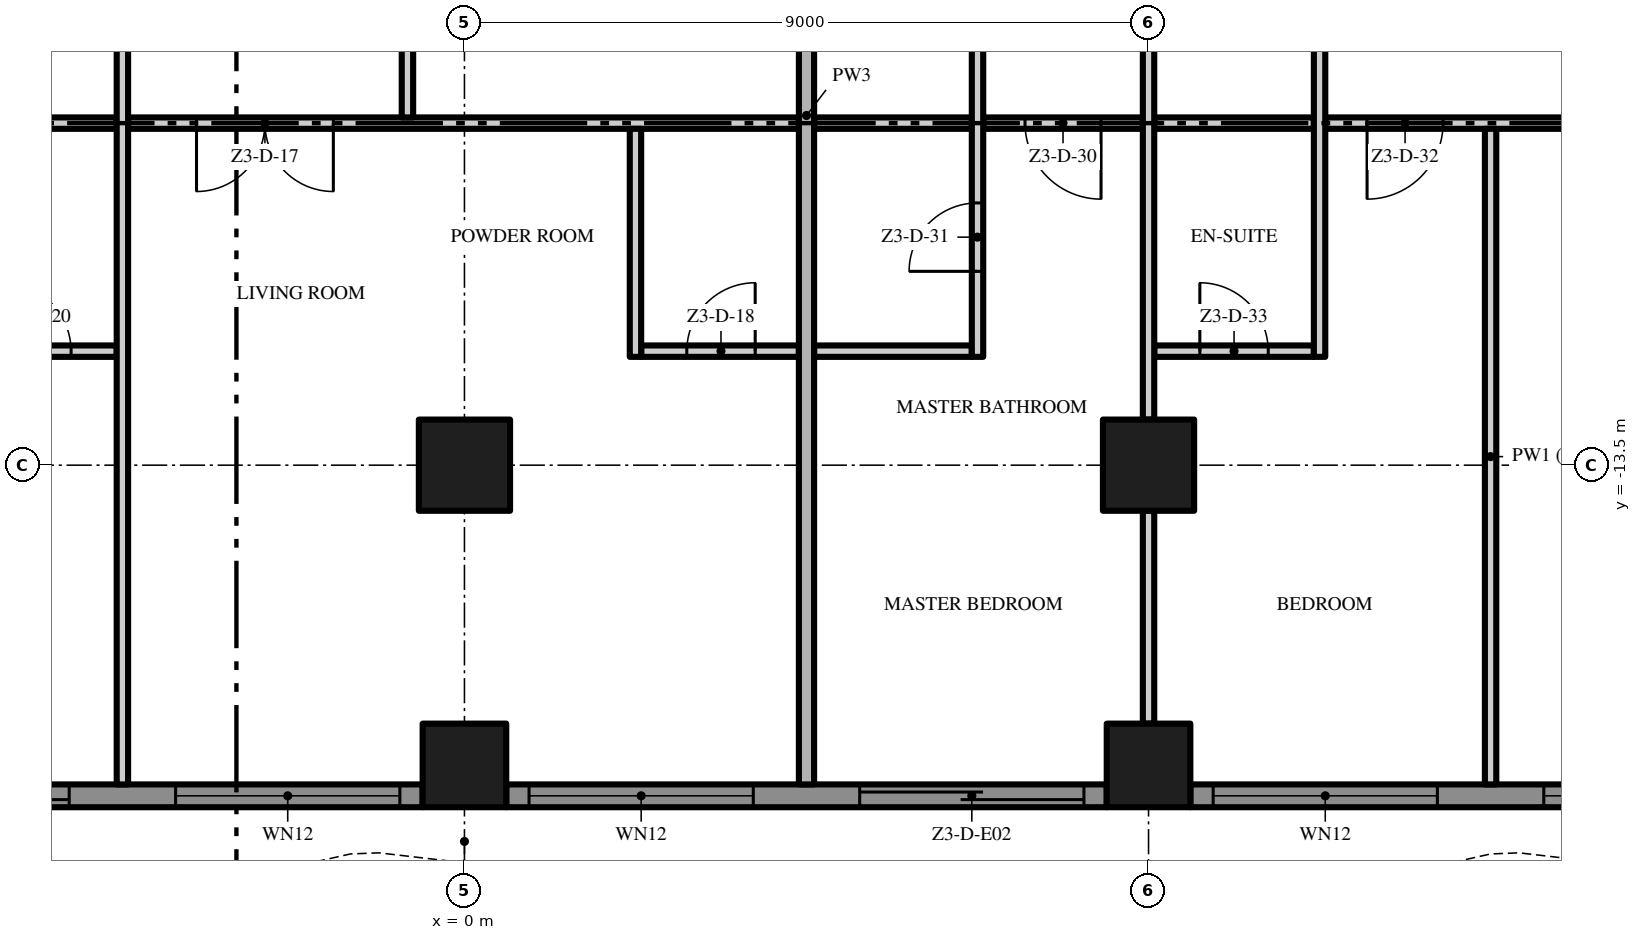
"""IFC4 building model, lengths in metres.
Left out: names, types, materials, properties, quantities, classifications, styles, units other than length and angle.
Written with IfcOpenShell. Run it as: python <this file> out.ifc"""

import sys

from ifc_helpers import new_model, si_unit, direction, frame, frame_2d, origin, origin_2d, place, context, subcontext, project, spatial, polyline, rectangle, outline, extrude, element, fill, save


model = new_model("IFC4")
c1 = context("Model", 3, precision=1e-05, world=origin(), true_north=direction((0.0, 1.0)))
c2 = subcontext(c1, "Body", "Model", "MODEL_VIEW")
j1 = project(units=[si_unit("LENGTHUNIT", "METRE"), si_unit("PLANEANGLEUNIT", "RADIAN")], contexts=[c1])
p1 = place(None, origin())
s1 = spatial("IfcSite", under=j1, at=p1, CompositionType="ELEMENT")
p2 = place(p1, origin())
s2 = spatial("IfcBuilding", under=s1, at=p2, CompositionType="ELEMENT")
p3 = place(p2, frame((0.0, 0.0, 163.0)))
s3 = spatial("IfcBuildingStorey", under=s2, at=p3, CompositionType="ELEMENT", Elevation=163.0)
p4 = place(p3, frame((0.0, -13.5, 0.0), z_axis=(0.0, 0.0, 1.0), x_axis=(1.0, 0.0, 0.0)))
e1 = element("IfcColumn", 1, at=p4, inside=s3, PredefinedType="COLUMN", context=c2, shape_type="SweptSolid", body=[
    extrude(rectangle(XDim=1.2, YDim=1.2, at=origin_2d()), origin(), (0.0, 0.0, 1.0), 3.5),
])
p5 = place(p3, frame((0.0, -17.45, 0.0), z_axis=(0.0, 0.0, 1.0), x_axis=(1.0, 0.0, 0.0)))
e2 = element("IfcColumn", 2, at=p5, inside=s3, PredefinedType="COLUMN", context=c2, shape_type="SweptSolid", body=[
    extrude(rectangle(XDim=1.1, YDim=1.1, at=origin_2d()), origin(), (0.0, 0.0, 1.0), 3.5),
])
p6 = place(p3, frame((9.0, -13.5, 0.0), z_axis=(0.0, 0.0, 1.0), x_axis=(1.0, 0.0, 0.0)))
e3 = element("IfcColumn", 3, at=p6, inside=s3, PredefinedType="COLUMN", context=c2, shape_type="SweptSolid", body=[
    extrude(rectangle(XDim=1.2, YDim=1.2, at=origin_2d()), origin(), (0.0, 0.0, 1.0), 3.5),
])
p7 = place(p3, frame((9.0, -17.45, 0.0), z_axis=(0.0, 0.0, 1.0), x_axis=(1.0, 0.0, 0.0)))
e4 = element("IfcColumn", 4, at=p7, inside=s3, PredefinedType="COLUMN", context=c2, shape_type="SweptSolid", body=[
    extrude(rectangle(XDim=1.1, YDim=1.1, at=origin_2d()), origin(), (0.0, 0.0, 1.0), 3.5),
])
p8 = place(p3, frame((-0.55, -17.85, 0.0), z_axis=(0.0, 0.0, 1.0), x_axis=(-1.0, 0.0, 0.0)))
e5 = element("IfcWall", 5, at=p8, inside=s3, PredefinedType="SOLIDWALL", context=c2, shape_type="SweptSolid", body=[
    extrude(rectangle(XDim=7.9, YDim=0.3, at=frame_2d((3.95, 0.0))), origin(), (0.0, 0.0, 1.0), 3.5),
])
p9 = place(p8, frame((4.65, 0.0, 0.0)))
e6 = element("IfcOpeningElement", 6, at=p9, cuts=e5, PredefinedType="OPENING", context=c2, shape_type="SweptSolid", body=[
    extrude(rectangle(XDim=2.95, YDim=2.4, at=frame_2d((1.475, 1.2))), frame((0.0, 0.16, 0.0), z_axis=(0.0, -1.0, 0.0), x_axis=(1.0, 0.0, 0.0)), (0.0, 0.0, 1.0), 0.32),
])
p10 = place(p8, frame((0.3, 0.0, 0.45)))
e7 = element("IfcOpeningElement", 7, at=p10, cuts=e5, PredefinedType="OPENING", context=c2, shape_type="SweptSolid", body=[
    extrude(rectangle(XDim=2.95, YDim=2.65, at=frame_2d((1.475, 1.325))), frame((0.0, 0.16, 0.0), z_axis=(0.0, -1.0, 0.0), x_axis=(1.0, 0.0, 0.0)), (0.0, 0.0, 1.0), 0.32),
])
p11 = place(p3, frame((8.45, -17.85, 0.0), z_axis=(0.0, 0.0, 1.0), x_axis=(-1.0, 0.0, 0.0)))
e8 = element("IfcWall", 8, at=p11, inside=s3, PredefinedType="SOLIDWALL", context=c2, shape_type="SweptSolid", body=[
    extrude(rectangle(XDim=7.9, YDim=0.3, at=frame_2d((3.95, 0.0))), origin(), (0.0, 0.0, 1.0), 3.5),
])
p12 = place(p11, frame((4.65, 0.0, 0.45)))
e9 = element("IfcOpeningElement", 9, at=p12, cuts=e8, PredefinedType="OPENING", context=c2, shape_type="SweptSolid", body=[
    extrude(rectangle(XDim=2.95, YDim=2.65, at=frame_2d((1.475, 1.325))), frame((0.0, 0.16, 0.0), z_axis=(0.0, -1.0, 0.0), x_axis=(1.0, 0.0, 0.0)), (0.0, 0.0, 1.0), 0.32),
])
p13 = place(p11, frame((0.3, 0.0, 0.0)))
e10 = element("IfcOpeningElement", 10, at=p13, cuts=e8, PredefinedType="OPENING", context=c2, shape_type="SweptSolid", body=[
    extrude(rectangle(XDim=2.95, YDim=2.4, at=frame_2d((1.475, 1.2))), frame((0.0, 0.16, 0.0), z_axis=(0.0, -1.0, 0.0), x_axis=(1.0, 0.0, 0.0)), (0.0, 0.0, 1.0), 0.32),
])
p14 = place(p3, frame((16.9, -17.85, 0.0), z_axis=(0.0, 0.0, 1.0), x_axis=(-1.0, 0.0, 0.0)))
e11 = element("IfcWall", 11, at=p14, inside=s3, PredefinedType="SOLIDWALL", context=c2, shape_type="SweptSolid", body=[
    extrude(rectangle(XDim=7.35, YDim=0.3, at=frame_2d((3.675, 0.0))), origin(), (0.0, 0.0, 1.0), 3.5),
])
p15 = place(p14, frame((4.1, 0.0, 0.45)))
e12 = element("IfcOpeningElement", 12, at=p15, cuts=e11, PredefinedType="OPENING", context=c2, shape_type="SweptSolid", body=[
    extrude(rectangle(XDim=2.95, YDim=2.65, at=frame_2d((1.475, 1.325))), frame((0.0, 0.16, 0.0), z_axis=(0.0, -1.0, 0.0), x_axis=(1.0, 0.0, 0.0)), (0.0, 0.0, 1.0), 0.32),
])
p16 = place(p14, frame((0.3, 0.0, 0.45)))
e13 = element("IfcOpeningElement", 13, at=p16, cuts=e11, PredefinedType="OPENING", context=c2, shape_type="SweptSolid", body=[
    extrude(rectangle(XDim=2.4, YDim=2.65, at=frame_2d((1.2, 1.325))), frame((0.0, 0.16, 0.0), z_axis=(0.0, -1.0, 0.0), x_axis=(1.0, 0.0, 0.0)), (0.0, 0.0, 1.0), 0.32),
])
p17 = place(p3, origin())
e14 = element("IfcWall", 14, at=p17, inside=s3, PredefinedType="USERDEFINED", context=c2, shape_type="SweptSolid", body=[
    extrude(outline(polyline([(-18.0, -18.951), (-16.5, -18.615), (-16.125, -18.6), (-15.0, -18.731), (-13.5, -19.255), (-12.0, -19.988), (-10.5, -20.649), (-9.0, -20.985), (-8.625, -21.0), (-7.5, -20.869), (-6.0, -20.345), (-4.5, -19.612), (-3.0, -18.951), (-1.5, -18.615), (-1.125, -18.6), (0.0, -18.731), (1.5, -19.255), (3.0, -19.988), (4.5, -20.649), (6.0, -20.985), (6.375, -21.0), (7.5, -20.869), (9.0, -20.345), (10.5, -19.612), (12.0, -18.951), (13.5, -18.615), (13.875, -18.6), (15.0, -18.731), (16.5, -19.255), (18.0, -19.988), (18.11, -19.763), (16.596, -19.024), (15.056, -18.486), (13.885, -18.349), (13.467, -18.366), (11.921, -18.713), (10.395, -19.385), (8.904, -20.114), (7.444, -20.624), (6.365, -20.749), (6.033, -20.736), (4.579, -20.41), (3.105, -19.761), (1.596, -19.024), (0.056, -18.486), (-1.115, -18.349), (-1.533, -18.366), (-3.079, -18.713), (-4.605, -19.385), (-6.096, -20.114), (-7.556, -20.624), (-8.635, -20.749), (-8.967, -20.736), (-10.421, -20.41), (-11.895, -19.761), (-13.404, -19.024), (-14.944, -18.486), (-16.115, -18.349), (-16.533, -18.366), (-18.055, -18.708), (-18.0, -18.951)])), origin(), (0.0, 0.0, 1.0), 0.9),
])
p18 = place(p3, frame((-6.675, -12.0, 0.0), z_axis=(0.0, 0.0, 1.0), x_axis=(1.0, 0.0, 0.0)))
e15 = element("IfcWall", 15, at=p18, inside=s3, PredefinedType="PARTITIONING", context=c2, shape_type="SweptSolid", body=[
    extrude(rectangle(XDim=2.1, YDim=0.15, at=frame_2d((1.05, 0.0))), origin(), (0.0, 0.0, 1.0), 3.5),
])
p19 = place(p18, frame((0.6, 0.0, 0.0)))
e16 = element("IfcOpeningElement", 16, at=p19, cuts=e15, PredefinedType="OPENING", context=c2, shape_type="SweptSolid", body=[
    extrude(rectangle(XDim=0.9, YDim=2.1, at=frame_2d((0.45, 1.05))), frame((0.0, 0.085, 0.0), z_axis=(0.0, -1.0, 0.0), x_axis=(1.0, 0.0, 0.0)), (0.0, 0.0, 1.0), 0.17),
])
p20 = place(p3, frame((2.325, -12.0, 0.0), z_axis=(0.0, 0.0, 1.0), x_axis=(1.0, 0.0, 0.0)))
e17 = element("IfcWall", 17, at=p20, inside=s3, PredefinedType="PARTITIONING", context=c2, shape_type="SweptSolid", body=[
    extrude(rectangle(XDim=2.075, YDim=0.15, at=frame_2d((1.038, 0.0))), origin(), (0.0, 0.0, 1.0), 3.5),
])
p21 = place(p20, frame((0.6, 0.0, 0.0)))
e18 = element("IfcOpeningElement", 18, at=p21, cuts=e17, PredefinedType="OPENING", context=c2, shape_type="SweptSolid", body=[
    extrude(rectangle(XDim=0.9, YDim=2.1, at=frame_2d((0.45, 1.05))), frame((0.0, 0.085, 0.0), z_axis=(0.0, -1.0, 0.0), x_axis=(1.0, 0.0, 0.0)), (0.0, 0.0, 1.0), 0.17),
])
p22 = place(p3, frame((4.6, -12.0, 0.0), z_axis=(0.0, 0.0, 1.0), x_axis=(1.0, 0.0, 0.0)))
e19 = element("IfcWall", 19, at=p22, inside=s3, PredefinedType="PARTITIONING", context=c2, shape_type="SweptSolid", body=[
    extrude(rectangle(XDim=2.075, YDim=0.15, at=frame_2d((1.038, 0.0))), origin(), (0.0, 0.0, 1.0), 3.5),
])
p23 = place(p3, frame((9.075, -12.0, 0.0), z_axis=(0.0, 0.0, 1.0), x_axis=(1.0, 0.0, 0.0)))
e20 = element("IfcWall", 20, at=p23, inside=s3, PredefinedType="PARTITIONING", context=c2, shape_type="SweptSolid", body=[
    extrude(rectangle(XDim=2.1, YDim=0.15, at=frame_2d((1.05, 0.0))), origin(), (0.0, 0.0, 1.0), 3.5),
])
p24 = place(p23, frame((0.6, 0.0, 0.0)))
e21 = element("IfcOpeningElement", 21, at=p24, cuts=e20, PredefinedType="OPENING", context=c2, shape_type="SweptSolid", body=[
    extrude(rectangle(XDim=0.9, YDim=2.1, at=frame_2d((0.45, 1.05))), frame((0.0, 0.085, 0.0), z_axis=(0.0, -1.0, 0.0), x_axis=(1.0, 0.0, 0.0)), (0.0, 0.0, 1.0), 0.17),
])
p25 = place(p3, frame((-6.675, -9.0, 0.0), z_axis=(0.0, 0.0, 1.0), x_axis=(1.0, 0.0, 0.0)))
e22 = element("IfcWall", 22, at=p25, inside=s3, PredefinedType="PARTITIONING", context=c2, shape_type="SweptSolid", body=[
    extrude(rectangle(XDim=2.1, YDim=0.15, at=frame_2d((1.05, 0.0))), origin(), (0.0, 0.0, 1.0), 3.5),
])
p26 = place(p3, frame((4.4, -9.0, 0.0), z_axis=(0.0, 0.0, 1.0), x_axis=(-1.0, 0.0, 0.0)))
e23 = element("IfcWall", 23, at=p26, inside=s3, PredefinedType="PARTITIONING", context=c2, shape_type="SweptSolid", body=[
    extrude(rectangle(XDim=8.825, YDim=0.15, at=frame_2d((4.412, 0.0))), origin(), (0.0, 0.0, 1.0), 3.5),
])
p27 = place(p26, frame((6.125, 0.0, 0.0)))
e24 = element("IfcOpeningElement", 24, at=p27, cuts=e23, PredefinedType="OPENING", context=c2, shape_type="SweptSolid", body=[
    extrude(rectangle(XDim=1.8, YDim=2.4, at=frame_2d((0.9, 1.2))), frame((0.0, 0.085, 0.0), z_axis=(0.0, -1.0, 0.0), x_axis=(1.0, 0.0, 0.0)), (0.0, 0.0, 1.0), 0.17),
])
p28 = place(p3, frame((4.6, -9.0, 0.0), z_axis=(0.0, 0.0, 1.0), x_axis=(1.0, 0.0, 0.0)))
e25 = element("IfcWall", 25, at=p28, inside=s3, PredefinedType="PARTITIONING", context=c2, shape_type="SweptSolid", body=[
    extrude(rectangle(XDim=2.075, YDim=0.15, at=frame_2d((1.038, 0.0))), origin(), (0.0, 0.0, 1.0), 3.5),
])
p29 = place(p3, frame((8.925, -9.0, 0.0), z_axis=(0.0, 0.0, 1.0), x_axis=(-1.0, 0.0, 0.0)))
e26 = element("IfcWall", 26, at=p29, inside=s3, PredefinedType="PARTITIONING", context=c2, shape_type="SweptSolid", body=[
    extrude(rectangle(XDim=2.1, YDim=0.15, at=frame_2d((1.05, 0.0))), origin(), (0.0, 0.0, 1.0), 3.5),
])
p30 = place(p29, frame((0.55, 0.0, 0.0)))
e27 = element("IfcOpeningElement", 27, at=p30, cuts=e26, PredefinedType="OPENING", context=c2, shape_type="SweptSolid", body=[
    extrude(rectangle(XDim=1.0, YDim=2.4, at=frame_2d((0.5, 1.2))), frame((0.0, 0.085, 0.0), z_axis=(0.0, -1.0, 0.0), x_axis=(1.0, 0.0, 0.0)), (0.0, 0.0, 1.0), 0.17),
])
p31 = place(p3, frame((9.075, -9.0, 0.0), z_axis=(0.0, 0.0, 1.0), x_axis=(1.0, 0.0, 0.0)))
e28 = element("IfcWall", 28, at=p31, inside=s3, PredefinedType="PARTITIONING", context=c2, shape_type="SweptSolid", body=[
    extrude(rectangle(XDim=2.1, YDim=0.15, at=frame_2d((1.05, 0.0))), origin(), (0.0, 0.0, 1.0), 3.5),
])
p32 = place(p3, frame((22.2, -9.0, 0.0), z_axis=(0.0, 0.0, 1.0), x_axis=(-1.0, 0.0, 0.0)))
e29 = element("IfcWall", 29, at=p32, inside=s3, PredefinedType="PARTITIONING", context=c2, shape_type="SweptSolid", body=[
    extrude(rectangle(XDim=10.875, YDim=0.15, at=frame_2d((5.438, 0.0))), origin(), (0.0, 0.0, 1.0), 3.5),
])
p33 = place(p32, frame((9.325, 0.0, 0.0)))
e30 = element("IfcOpeningElement", 30, at=p33, cuts=e29, PredefinedType="OPENING", context=c2, shape_type="SweptSolid", body=[
    extrude(rectangle(XDim=1.0, YDim=2.4, at=frame_2d((0.5, 1.2))), frame((0.0, 0.085, 0.0), z_axis=(0.0, -1.0, 0.0), x_axis=(1.0, 0.0, 0.0)), (0.0, 0.0, 1.0), 0.17),
])
p34 = place(p32, frame((5.95, 0.0, 0.0)))
e31 = element("IfcOpeningElement", 31, at=p34, cuts=e29, PredefinedType="OPENING", context=c2, shape_type="SweptSolid", body=[
    extrude(rectangle(XDim=1.8, YDim=2.4, at=frame_2d((0.9, 1.2))), frame((0.0, 0.085, 0.0), z_axis=(0.0, -1.0, 0.0), x_axis=(1.0, 0.0, 0.0)), (0.0, 0.0, 1.0), 0.17),
])
p35 = place(p3, frame((-4.5, -17.7, 0.0), z_axis=(0.0, 0.0, 1.0), x_axis=(0.0, 1.0, 0.0)))
e32 = element("IfcWall", 32, at=p35, inside=s3, PredefinedType="PARTITIONING", context=c2, shape_type="SweptSolid", body=[
    extrude(rectangle(XDim=13.275, YDim=0.15, at=frame_2d((6.638, 0.0))), origin(), (0.0, 0.0, 1.0), 3.5),
])
p36 = place(p35, frame((10.5, 0.0, 0.0)))
e33 = element("IfcOpeningElement", 33, at=p36, cuts=e32, PredefinedType="OPENING", context=c2, shape_type="SweptSolid", body=[
    extrude(rectangle(XDim=0.9, YDim=2.1, at=frame_2d((0.45, 1.05))), frame((0.0, 0.085, 0.0), z_axis=(0.0, -1.0, 0.0), x_axis=(1.0, 0.0, 0.0)), (0.0, 0.0, 1.0), 0.17),
])
p37 = place(p3, frame((-0.75, -8.925, 0.0), z_axis=(0.0, 0.0, 1.0), x_axis=(0.0, 1.0, 0.0)))
e34 = element("IfcWall", 34, at=p37, inside=s3, PredefinedType="PARTITIONING", context=c2, shape_type="SweptSolid", body=[
    extrude(rectangle(XDim=4.5, YDim=0.15, at=frame_2d((2.25, 0.0))), origin(), (0.0, 0.0, 1.0), 3.5),
])
p38 = place(p3, frame((2.25, -12.075, 0.0), z_axis=(0.0, 0.0, 1.0), x_axis=(0.0, 1.0, 0.0)))
e35 = element("IfcWall", 35, at=p38, inside=s3, PredefinedType="PARTITIONING", context=c2, shape_type="SweptSolid", body=[
    extrude(rectangle(XDim=3.0, YDim=0.15, at=frame_2d((1.5, 0.0))), origin(), (0.0, 0.0, 1.0), 3.5),
])
p39 = place(p3, frame((4.5, -17.7, 0.0), z_axis=(0.0, 0.0, 1.0), x_axis=(0.0, 1.0, 0.0)))
e36 = element("IfcWall", 36, at=p39, inside=s3, PredefinedType="PARTITIONING", context=c2, shape_type="SweptSolid", body=[
    extrude(rectangle(XDim=17.6, YDim=0.2, at=frame_2d((8.8, 0.0))), origin(), (0.0, 0.0, 1.0), 3.5),
])
p40 = place(p3, frame((6.75, -12.075, 0.0), z_axis=(0.0, 0.0, 1.0), x_axis=(0.0, 1.0, 0.0)))
e37 = element("IfcWall", 37, at=p40, inside=s3, PredefinedType="PARTITIONING", context=c2, shape_type="SweptSolid", body=[
    extrude(rectangle(XDim=7.65, YDim=0.15, at=frame_2d((3.825, 0.0))), origin(), (0.0, 0.0, 1.0), 3.5),
])
p41 = place(p40, frame((4.875, 0.0, 0.0)))
e38 = element("IfcOpeningElement", 38, at=p41, cuts=e37, PredefinedType="OPENING", context=c2, shape_type="SweptSolid", body=[
    extrude(rectangle(XDim=0.9, YDim=2.1, at=frame_2d((0.45, 1.05))), frame((0.0, 0.085, 0.0), z_axis=(0.0, -1.0, 0.0), x_axis=(1.0, 0.0, 0.0)), (0.0, 0.0, 1.0), 0.17),
])
p42 = place(p40, frame((1.125, 0.0, 0.0)))
e39 = element("IfcOpeningElement", 39, at=p42, cuts=e37, PredefinedType="OPENING", context=c2, shape_type="SweptSolid", body=[
    extrude(rectangle(XDim=0.9, YDim=2.1, at=frame_2d((0.45, 1.05))), frame((0.0, 0.085, 0.0), z_axis=(0.0, -1.0, 0.0), x_axis=(1.0, 0.0, 0.0)), (0.0, 0.0, 1.0), 0.17),
])
p43 = place(p3, frame((9.0, -16.9, 0.0), z_axis=(0.0, 0.0, 1.0), x_axis=(0.0, 1.0, 0.0)))
e40 = element("IfcWall", 40, at=p43, inside=s3, PredefinedType="PARTITIONING", context=c2, shape_type="SweptSolid", body=[
    extrude(rectangle(XDim=2.8, YDim=0.15, at=frame_2d((1.4, 0.0))), origin(), (0.0, 0.0, 1.0), 3.5),
])
p44 = place(p3, frame((9.0, -12.9, 0.0), z_axis=(0.0, 0.0, 1.0), x_axis=(0.0, 1.0, 0.0)))
e41 = element("IfcWall", 41, at=p44, inside=s3, PredefinedType="PARTITIONING", context=c2, shape_type="SweptSolid", body=[
    extrude(rectangle(XDim=7.8, YDim=0.15, at=frame_2d((3.9, 0.0))), origin(), (0.0, 0.0, 1.0), 3.5),
])
p45 = place(p3, frame((11.25, -12.075, 0.0), z_axis=(0.0, 0.0, 1.0), x_axis=(0.0, 1.0, 0.0)))
e42 = element("IfcWall", 42, at=p45, inside=s3, PredefinedType="PARTITIONING", context=c2, shape_type="SweptSolid", body=[
    extrude(rectangle(XDim=7.65, YDim=0.15, at=frame_2d((3.825, 0.0))), origin(), (0.0, 0.0, 1.0), 3.5),
])
p46 = place(p3, frame((13.5, -17.7, 0.0), z_axis=(0.0, 0.0, 1.0), x_axis=(0.0, 1.0, 0.0)))
e43 = element("IfcWall", 43, at=p46, inside=s3, PredefinedType="PARTITIONING", context=c2, shape_type="SweptSolid", body=[
    extrude(rectangle(XDim=8.625, YDim=0.15, at=frame_2d((4.312, 0.0))), origin(), (0.0, 0.0, 1.0), 3.5),
])
p47 = place(p9, origin())
e44 = element("IfcDoor", 44, at=p47, inside=s3, OperationType="SINGLE_SWING_LEFT", PredefinedType="DOOR", context=c2, shape_type="SweptSolid", body=[
    extrude(rectangle(XDim=2.95, YDim=2.4, at=frame_2d((1.475, 1.2))), frame((0.0, 0.025, 0.0), z_axis=(0.0, -1.0, 0.0), x_axis=(1.0, 0.0, 0.0)), (0.0, 0.0, 1.0), 0.05),
])
fill(e6, e44)
p48 = place(p10, origin())
e45 = element("IfcWindow", 45, at=p48, inside=s3, PartitioningType="SINGLE_PANEL", PredefinedType="WINDOW", context=c2, shape_type="SweptSolid", body=[
    extrude(rectangle(XDim=2.95, YDim=2.65, at=frame_2d((1.475, 1.325))), frame((0.0, 0.03, 0.0), z_axis=(0.0, -1.0, 0.0), x_axis=(1.0, 0.0, 0.0)), (0.0, 0.0, 1.0), 0.06),
])
fill(e7, e45)
p49 = place(p12, origin())
e46 = element("IfcWindow", 46, at=p49, inside=s3, PartitioningType="SINGLE_PANEL", PredefinedType="WINDOW", context=c2, shape_type="SweptSolid", body=[
    extrude(rectangle(XDim=2.95, YDim=2.65, at=frame_2d((1.475, 1.325))), frame((0.0, 0.03, 0.0), z_axis=(0.0, -1.0, 0.0), x_axis=(1.0, 0.0, 0.0)), (0.0, 0.0, 1.0), 0.06),
])
fill(e9, e46)
p50 = place(p13, origin())
e47 = element("IfcDoor", 47, at=p50, inside=s3, OperationType="SINGLE_SWING_LEFT", PredefinedType="DOOR", context=c2, shape_type="SweptSolid", body=[
    extrude(rectangle(XDim=2.95, YDim=2.4, at=frame_2d((1.475, 1.2))), frame((0.0, 0.025, 0.0), z_axis=(0.0, -1.0, 0.0), x_axis=(1.0, 0.0, 0.0)), (0.0, 0.0, 1.0), 0.05),
])
fill(e10, e47)
p51 = place(p15, origin())
e48 = element("IfcWindow", 48, at=p51, inside=s3, PartitioningType="SINGLE_PANEL", PredefinedType="WINDOW", context=c2, shape_type="SweptSolid", body=[
    extrude(rectangle(XDim=2.95, YDim=2.65, at=frame_2d((1.475, 1.325))), frame((0.0, 0.03, 0.0), z_axis=(0.0, -1.0, 0.0), x_axis=(1.0, 0.0, 0.0)), (0.0, 0.0, 1.0), 0.06),
])
fill(e12, e48)
p52 = place(p16, origin())
e49 = element("IfcWindow", 49, at=p52, inside=s3, PartitioningType="SINGLE_PANEL", PredefinedType="WINDOW", context=c2, shape_type="SweptSolid", body=[
    extrude(rectangle(XDim=2.4, YDim=2.65, at=frame_2d((1.2, 1.325))), frame((0.0, 0.03, 0.0), z_axis=(0.0, -1.0, 0.0), x_axis=(1.0, 0.0, 0.0)), (0.0, 0.0, 1.0), 0.06),
])
fill(e13, e49)
p53 = place(p27, origin())
e50 = element("IfcDoor", 50, at=p53, inside=s3, OperationType="DOUBLE_DOOR_SINGLE_SWING", PredefinedType="DOOR", context=c2, shape_type="SweptSolid", body=[
    extrude(rectangle(XDim=1.8, YDim=2.4, at=frame_2d((0.9, 1.2))), frame((0.0, 0.025, 0.0), z_axis=(0.0, -1.0, 0.0), x_axis=(1.0, 0.0, 0.0)), (0.0, 0.0, 1.0), 0.05),
])
fill(e24, e50)
p54 = place(p21, origin())
e51 = element("IfcDoor", 51, at=p54, inside=s3, OperationType="SINGLE_SWING_RIGHT", PredefinedType="DOOR", context=c2, shape_type="SweptSolid", body=[
    extrude(rectangle(XDim=0.9, YDim=2.1, at=frame_2d((0.45, 1.05))), frame((0.0, 0.025, 0.0), z_axis=(0.0, -1.0, 0.0), x_axis=(1.0, 0.0, 0.0)), (0.0, 0.0, 1.0), 0.05),
])
fill(e18, e51)
p55 = place(p19, origin())
e52 = element("IfcDoor", 52, at=p55, inside=s3, OperationType="SINGLE_SWING_LEFT", PredefinedType="DOOR", context=c2, shape_type="SweptSolid", body=[
    extrude(rectangle(XDim=0.9, YDim=2.1, at=frame_2d((0.45, 1.05))), frame((0.0, 0.025, 0.0), z_axis=(0.0, -1.0, 0.0), x_axis=(1.0, 0.0, 0.0)), (0.0, 0.0, 1.0), 0.05),
])
fill(e16, e52)
p56 = place(p30, origin())
e53 = element("IfcDoor", 53, at=p56, inside=s3, OperationType="SINGLE_SWING_LEFT", PredefinedType="DOOR", context=c2, shape_type="SweptSolid", body=[
    extrude(rectangle(XDim=1.0, YDim=2.4, at=frame_2d((0.5, 1.2))), frame((0.0, 0.025, 0.0), z_axis=(0.0, -1.0, 0.0), x_axis=(1.0, 0.0, 0.0)), (0.0, 0.0, 1.0), 0.05),
])
fill(e27, e53)
p57 = place(p42, origin())
e54 = element("IfcDoor", 54, at=p57, inside=s3, OperationType="SINGLE_SWING_LEFT", PredefinedType="DOOR", context=c2, shape_type="SweptSolid", body=[
    extrude(rectangle(XDim=0.9, YDim=2.1, at=frame_2d((0.45, 1.05))), frame((0.0, 0.025, 0.0), z_axis=(0.0, -1.0, 0.0), x_axis=(1.0, 0.0, 0.0)), (0.0, 0.0, 1.0), 0.05),
])
fill(e39, e54)
p58 = place(p33, origin())
e55 = element("IfcDoor", 55, at=p58, inside=s3, OperationType="SINGLE_SWING_RIGHT", PredefinedType="DOOR", context=c2, shape_type="SweptSolid", body=[
    extrude(rectangle(XDim=1.0, YDim=2.4, at=frame_2d((0.5, 1.2))), frame((0.0, 0.025, 0.0), z_axis=(0.0, -1.0, 0.0), x_axis=(1.0, 0.0, 0.0)), (0.0, 0.0, 1.0), 0.05),
])
fill(e30, e55)
p59 = place(p24, origin())
e56 = element("IfcDoor", 56, at=p59, inside=s3, OperationType="SINGLE_SWING_LEFT", PredefinedType="DOOR", context=c2, shape_type="SweptSolid", body=[
    extrude(rectangle(XDim=0.9, YDim=2.1, at=frame_2d((0.45, 1.05))), frame((0.0, 0.025, 0.0), z_axis=(0.0, -1.0, 0.0), x_axis=(1.0, 0.0, 0.0)), (0.0, 0.0, 1.0), 0.05),
])
fill(e21, e56)
save(model, sys.argv[1])
